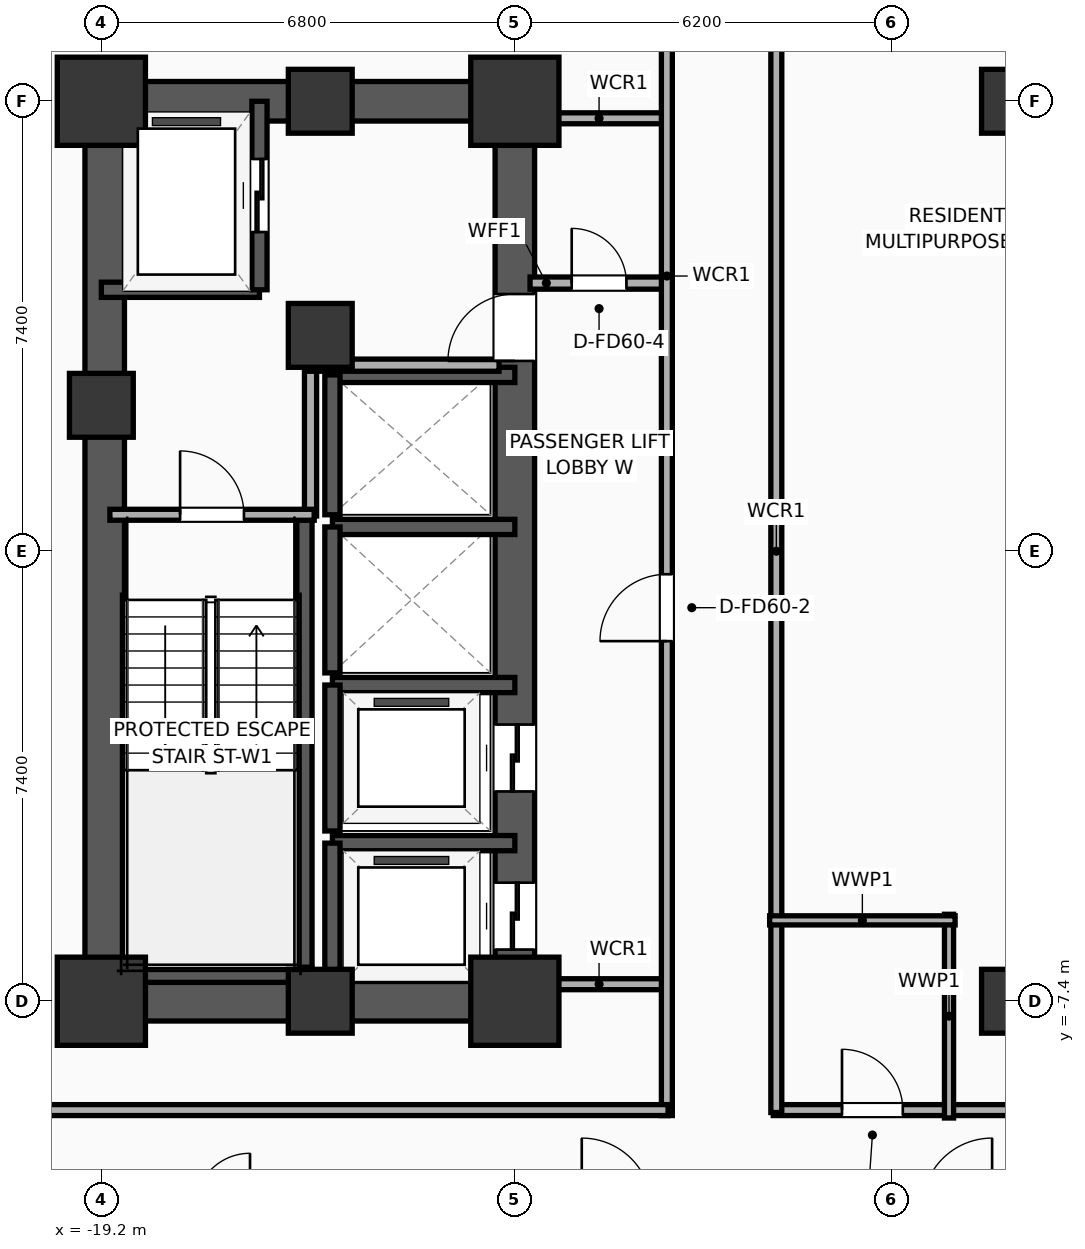
"""IFC4 building model, lengths in metres.
Left out: names, types, materials, properties, quantities, classifications, styles, units other than length and angle.
Written with IfcOpenShell. Run it as: python <this file> out.ifc"""

import sys

from ifc_helpers import new_model, si_unit, direction, frame, frame_2d, origin, origin_2d, place, context, subcontext, project, spatial, rectangle, extrude, element, fill, save


model = new_model("IFC4")
c1 = context("Model", 3, precision=1e-05, world=origin(), true_north=direction((0.0, 1.0)))
c2 = subcontext(c1, "Body", "Model", "MODEL_VIEW")
j1 = project(units=[si_unit("LENGTHUNIT", "METRE"), si_unit("PLANEANGLEUNIT", "RADIAN")], contexts=[c1])
p1 = place(None, origin())
s1 = spatial("IfcSite", under=j1, at=p1, CompositionType="ELEMENT")
p2 = place(p1, origin())
s2 = spatial("IfcBuilding", under=s1, at=p2, CompositionType="ELEMENT")
p3 = place(p2, frame((0.0, 0.0, 61.1)))
s3 = spatial("IfcBuildingStorey", under=s2, at=p3, CompositionType="ELEMENT", Elevation=61.1)
p4 = place(p3, frame((-19.2, -7.4, 0.0), z_axis=(0.0, 0.0, 1.0), x_axis=(1.0, 0.0, 0.0)))
e1 = element("IfcColumn", 1, at=p4, inside=s3, PredefinedType="COLUMN", context=c2, shape_type="SweptSolid", body=[
    extrude(rectangle(XDim=1.45, YDim=1.45, at=origin_2d()), origin(), (0.0, 0.0, 1.0), 3.9),
])
p5 = place(p3, frame((-19.2, 2.4, 0.0), z_axis=(0.0, 0.0, 1.0), x_axis=(1.0, 0.0, 0.0)))
e2 = element("IfcColumn", 2, at=p5, inside=s3, PredefinedType="COLUMN", context=c2, shape_type="SweptSolid", body=[
    extrude(rectangle(XDim=1.05, YDim=1.05, at=origin_2d()), origin(), (0.0, 0.0, 1.0), 3.9),
])
p6 = place(p3, frame((-19.2, 7.4, 0.0), z_axis=(0.0, 0.0, 1.0), x_axis=(1.0, 0.0, 0.0)))
e3 = element("IfcColumn", 3, at=p6, inside=s3, PredefinedType="COLUMN", context=c2, shape_type="SweptSolid", body=[
    extrude(rectangle(XDim=1.45, YDim=1.45, at=origin_2d()), origin(), (0.0, 0.0, 1.0), 3.9),
])
for number, where, z_axis, x_axis in (
    (4, (-15.6, -7.4, 0.0), (0.0, 0.0, 1.0), (1.0, 0.0, 0.0)),
    (5, (-15.6, 7.4, 0.0), (0.0, 0.0, 1.0), (1.0, 0.0, 0.0)),
):
    element("IfcColumn", number, at=place(p3, frame(where, z_axis=z_axis, x_axis=x_axis)), inside=s3, PredefinedType="COLUMN", context=c2, shape_type="SweptSolid", body=[
        extrude(rectangle(XDim=1.05, YDim=1.05, at=origin_2d()), origin(), (0.0, 0.0, 1.0), 3.9),
    ])
p7 = place(p3, frame((-12.4, -7.4, 0.0), z_axis=(0.0, 0.0, 1.0), x_axis=(1.0, 0.0, 0.0)))
e6 = element("IfcColumn", 6, at=p7, inside=s3, PredefinedType="COLUMN", context=c2, shape_type="SweptSolid", body=[
    extrude(rectangle(XDim=1.45, YDim=1.45, at=origin_2d()), origin(), (0.0, 0.0, 1.0), 3.9),
])
p8 = place(p3, frame((-15.6, 3.55, 0.0), z_axis=(0.0, 0.0, 1.0), x_axis=(1.0, 0.0, 0.0)))
e7 = element("IfcColumn", 7, at=p8, inside=s3, PredefinedType="COLUMN", context=c2, shape_type="SweptSolid", body=[
    extrude(rectangle(XDim=1.05, YDim=1.05, at=origin_2d()), origin(), (0.0, 0.0, 1.0), 3.9),
])
p9 = place(p3, frame((-12.4, 7.4, 0.0), z_axis=(0.0, 0.0, 1.0), x_axis=(1.0, 0.0, 0.0)))
e8 = element("IfcColumn", 8, at=p9, inside=s3, PredefinedType="COLUMN", context=c2, shape_type="SweptSolid", body=[
    extrude(rectangle(XDim=1.45, YDim=1.45, at=origin_2d()), origin(), (0.0, 0.0, 1.0), 3.9),
])
for number, where, z_axis, x_axis in (
    (9, (-19.525, -7.4, 0.0), (0.0, 0.0, 1.0), (1.0, 0.0, 0.0)),
    (10, (-19.525, 7.4, 0.0), (0.0, 0.0, 1.0), (1.0, 0.0, 0.0)),
):
    element("IfcWall", number, at=place(p3, frame(where, z_axis=z_axis, x_axis=x_axis)), inside=s3, PredefinedType="SHEAR", context=c2, shape_type="SweptSolid", body=[
        extrude(rectangle(XDim=7.45, YDim=0.65, at=frame_2d((3.725, 0.0))), origin(), (0.0, 0.0, 1.0), 3.65),
    ])
p10 = place(p3, frame((-19.145, -7.4, 0.0), z_axis=(0.0, 0.0, 1.0), x_axis=(0.0, 1.0, 0.0)))
e11 = element("IfcWall", 11, at=p10, inside=s3, PredefinedType="SHEAR", context=c2, shape_type="SweptSolid", body=[
    extrude(rectangle(XDim=14.8, YDim=0.65, at=frame_2d((7.4, 0.0))), origin(), (0.0, 0.0, 1.0), 3.65),
])
p11 = place(p3, frame((-12.4, -7.4, 0.0), z_axis=(0.0, 0.0, 1.0), x_axis=(0.0, 1.0, 0.0)))
e12 = element("IfcWall", 12, at=p11, inside=s3, PredefinedType="SHEAR", context=c2, shape_type="SweptSolid", body=[
    extrude(rectangle(XDim=14.8, YDim=0.65, at=frame_2d((7.4, 0.0))), origin(), (0.0, 0.0, 1.0), 3.65),
])
p12 = place(p11, frame((0.85, 0.0, 0.0)))
e13 = element("IfcOpeningElement", 13, at=p12, cuts=e12, PredefinedType="OPENING", context=c2, shape_type="SweptSolid", body=[
    extrude(rectangle(XDim=1.1, YDim=2.05, at=frame_2d((0.55, 1.025))), frame((0.0, 0.335, 0.0), z_axis=(0.0, -1.0, 0.0), x_axis=(1.0, 0.0, 0.0)), (0.0, 0.0, 1.0), 0.67),
])
p13 = place(p11, frame((3.45, 0.0, 0.0)))
e14 = element("IfcOpeningElement", 14, at=p13, cuts=e12, PredefinedType="OPENING", context=c2, shape_type="SweptSolid", body=[
    extrude(rectangle(XDim=1.1, YDim=2.05, at=frame_2d((0.55, 1.025))), frame((0.0, 0.335, 0.0), z_axis=(0.0, -1.0, 0.0), x_axis=(1.0, 0.0, 0.0)), (0.0, 0.0, 1.0), 0.67),
])
p14 = place(p11, frame((10.53, 0.0, 0.0)))
e15 = element("IfcOpeningElement", 15, at=p14, cuts=e12, PredefinedType="OPENING", context=c2, shape_type="SweptSolid", body=[
    extrude(rectangle(XDim=1.1, YDim=2.05, at=frame_2d((0.55, 1.025))), frame((0.0, 0.335, 0.0), z_axis=(0.0, -1.0, 0.0), x_axis=(1.0, 0.0, 0.0)), (0.0, 0.0, 1.0), 0.67),
])
p15 = place(p3, frame((-15.86, -7.085, 0.0), z_axis=(0.0, 0.0, 1.0), x_axis=(0.0, 1.0, 0.0)))
e16 = element("IfcWall", 16, at=p15, inside=s3, PredefinedType="SOLIDWALL", context=c2, shape_type="SweptSolid", body=[
    extrude(rectangle(XDim=7.685, YDim=0.25, at=frame_2d((3.843, 0.0))), origin(), (0.0, 0.0, 1.0), 3.65),
])
p16 = place(p3, frame((-19.2, -6.965, 0.0), z_axis=(0.0, 0.0, 1.0), x_axis=(1.0, 0.0, 0.0)))
e17 = element("IfcWall", 17, at=p16, inside=s3, PredefinedType="SOLIDWALL", context=c2, shape_type="SweptSolid", body=[
    extrude(rectangle(XDim=3.46, YDim=0.25, at=frame_2d((1.73, 0.0))), origin(), (0.0, 0.0, 1.0), 3.65),
])
for number, where, z_axis, x_axis in (
    (18, (-4.2, -7.4, 0.0), (0.0, 0.0, 1.0), (1.0, 0.0, 0.0)),
    (19, (-4.2, 7.4, 0.0), (0.0, 0.0, 1.0), (1.0, 0.0, 0.0)),
):
    element("IfcColumn", number, at=place(p3, frame(where, z_axis=z_axis, x_axis=x_axis)), inside=s3, PredefinedType="COLUMN", context=c2, shape_type="SweptSolid", body=[
        extrude(rectangle(XDim=1.05, YDim=1.05, at=origin_2d()), origin(), (0.0, 0.0, 1.0), 3.9),
    ])
p17 = place(p3, frame((-19.2, 4.3, 0.0), z_axis=(0.0, 0.0, 1.0), x_axis=(1.0, 0.0, 0.0)))
e20 = element("IfcWall", 20, at=p17, inside=s3, PredefinedType="SOLIDWALL", context=c2, shape_type="SweptSolid", body=[
    extrude(rectangle(XDim=2.6, YDim=0.25, at=frame_2d((1.3, 0.0))), origin(), (0.0, 0.0, 1.0), 3.65),
])
p18 = place(p3, frame((-16.6, 4.3, 0.0), z_axis=(0.0, 0.0, 1.0), x_axis=(0.0, 1.0, 0.0)))
e21 = element("IfcWall", 21, at=p18, inside=s3, PredefinedType="SOLIDWALL", context=c2, shape_type="SweptSolid", body=[
    extrude(rectangle(XDim=3.1, YDim=0.25, at=frame_2d((1.55, 0.0))), origin(), (0.0, 0.0, 1.0), 3.65),
])
p19 = place(p18, frame((0.95, 0.0, 0.0)))
e22 = element("IfcOpeningElement", 22, at=p19, cuts=e21, PredefinedType="OPENING", context=c2, shape_type="SweptSolid", body=[
    extrude(rectangle(XDim=1.2, YDim=2.05, at=frame_2d((0.6, 1.025))), frame((0.0, 0.135, 0.0), z_axis=(0.0, -1.0, 0.0), x_axis=(1.0, 0.0, 0.0)), (0.0, 0.0, 1.0), 0.27),
])
p20 = place(p3, frame((-12.4, -4.8, 0.0), z_axis=(0.0, 0.0, 1.0), x_axis=(-1.0, 0.0, 0.0)))
e23 = element("IfcWall", 23, at=p20, inside=s3, PredefinedType="SOLIDWALL", context=c2, shape_type="SweptSolid", body=[
    extrude(rectangle(XDim=3.0, YDim=0.25, at=frame_2d((1.5, 0.0))), origin(), (0.0, 0.0, 1.0), 3.65),
])
p21 = place(p3, frame((-15.4, -4.8, 0.0), z_axis=(0.0, 0.0, 1.0), x_axis=(0.0, -1.0, 0.0)))
e24 = element("IfcWall", 24, at=p21, inside=s3, PredefinedType="SOLIDWALL", context=c2, shape_type="SweptSolid", body=[
    extrude(rectangle(XDim=2.6, YDim=0.25, at=frame_2d((1.3, 0.0))), origin(), (0.0, 0.0, 1.0), 3.65),
])
p22 = place(p3, frame((-12.4, -2.2, 0.0), z_axis=(0.0, 0.0, 1.0), x_axis=(-1.0, 0.0, 0.0)))
e25 = element("IfcWall", 25, at=p22, inside=s3, PredefinedType="SOLIDWALL", context=c2, shape_type="SweptSolid", body=[
    extrude(rectangle(XDim=3.0, YDim=0.25, at=frame_2d((1.5, 0.0))), origin(), (0.0, 0.0, 1.0), 3.65),
])
p23 = place(p3, frame((-15.4, -2.2, 0.0), z_axis=(0.0, 0.0, 1.0), x_axis=(0.0, -1.0, 0.0)))
e26 = element("IfcWall", 26, at=p23, inside=s3, PredefinedType="SOLIDWALL", context=c2, shape_type="SweptSolid", body=[
    extrude(rectangle(XDim=2.4, YDim=0.25, at=frame_2d((1.2, 0.0))), origin(), (0.0, 0.0, 1.0), 3.65),
])
p24 = place(p3, frame((-12.4, 0.4, 0.0), z_axis=(0.0, 0.0, 1.0), x_axis=(-1.0, 0.0, 0.0)))
e27 = element("IfcWall", 27, at=p24, inside=s3, PredefinedType="SOLIDWALL", context=c2, shape_type="SweptSolid", body=[
    extrude(rectangle(XDim=3.0, YDim=0.25, at=frame_2d((1.5, 0.0))), origin(), (0.0, 0.0, 1.0), 3.65),
])
p25 = place(p3, frame((-15.4, 0.4, 0.0), z_axis=(0.0, 0.0, 1.0), x_axis=(0.0, -1.0, 0.0)))
e28 = element("IfcWall", 28, at=p25, inside=s3, PredefinedType="SOLIDWALL", context=c2, shape_type="SweptSolid", body=[
    extrude(rectangle(XDim=2.4, YDim=0.25, at=frame_2d((1.2, 0.0))), origin(), (0.0, 0.0, 1.0), 3.65),
])
p26 = place(p3, frame((-12.4, 2.9, 0.0), z_axis=(0.0, 0.0, 1.0), x_axis=(-1.0, 0.0, 0.0)))
e29 = element("IfcWall", 29, at=p26, inside=s3, PredefinedType="SOLIDWALL", context=c2, shape_type="SweptSolid", body=[
    extrude(rectangle(XDim=3.0, YDim=0.25, at=frame_2d((1.5, 0.0))), origin(), (0.0, 0.0, 1.0), 3.65),
])
p27 = place(p3, frame((-15.4, 2.9, 0.0), z_axis=(0.0, 0.0, 1.0), x_axis=(0.0, -1.0, 0.0)))
e30 = element("IfcWall", 30, at=p27, inside=s3, PredefinedType="SOLIDWALL", context=c2, shape_type="SweptSolid", body=[
    extrude(rectangle(XDim=2.3, YDim=0.25, at=frame_2d((1.15, 0.0))), origin(), (0.0, 0.0, 1.0), 3.65),
])
p28 = place(p3, frame((-15.76, 0.58, 0.0), z_axis=(0.0, 0.0, 1.0), x_axis=(0.0, 1.0, 0.0)))
e31 = element("IfcWall", 31, at=p28, inside=s3, PredefinedType="PARTITIONING", context=c2, shape_type="SweptSolid", body=[
    extrude(rectangle(XDim=2.52, YDim=0.2, at=frame_2d((1.26, 0.0))), origin(), (0.0, 0.0, 1.0), 3.65),
])
p29 = place(p3, frame((-15.82, 3.06, 0.0), z_axis=(0.0, 0.0, 1.0), x_axis=(1.0, 0.0, 0.0)))
e32 = element("IfcWall", 32, at=p29, inside=s3, PredefinedType="PARTITIONING", context=c2, shape_type="SweptSolid", body=[
    extrude(rectangle(XDim=3.16, YDim=0.2, at=frame_2d((1.58, 0.0))), origin(), (0.0, 0.0, 1.0), 3.65),
])
p30 = place(p3, frame((-19.06, 0.6, 0.0), z_axis=(0.0, 0.0, 1.0), x_axis=(1.0, 0.0, 0.0)))
e33 = element("IfcWall", 33, at=p30, inside=s3, PredefinedType="PARTITIONING", context=c2, shape_type="SweptSolid", body=[
    extrude(rectangle(XDim=3.36, YDim=0.18, at=frame_2d((1.68, 0.0))), origin(), (0.0, 0.0, 1.0), 3.65),
])
p31 = place(p30, frame((1.155, 0.0, 0.0)))
e34 = element("IfcOpeningElement", 34, at=p31, cuts=e33, PredefinedType="OPENING", context=c2, shape_type="SweptSolid", body=[
    extrude(rectangle(XDim=1.05, YDim=2.05, at=frame_2d((0.525, 1.025))), frame((0.0, 0.1, 0.0), z_axis=(0.0, -1.0, 0.0), x_axis=(1.0, 0.0, 0.0)), (0.0, 0.0, 1.0), 0.2),
])
p32 = place(p3, frame((-12.15, 4.41, 0.0), z_axis=(0.0, 0.0, 1.0), x_axis=(1.0, 0.0, 0.0)))
e35 = element("IfcWall", 35, at=p32, inside=s3, PredefinedType="PARTITIONING", context=c2, shape_type="SweptSolid", body=[
    extrude(rectangle(XDim=2.27, YDim=0.2, at=frame_2d((1.135, 0.0))), origin(), (0.0, 0.0, 1.0), 3.65),
])
p33 = place(p32, frame((0.685, 0.0, 0.0)))
e36 = element("IfcOpeningElement", 36, at=p33, cuts=e35, PredefinedType="OPENING", context=c2, shape_type="SweptSolid", body=[
    extrude(rectangle(XDim=0.9, YDim=2.05, at=frame_2d((0.45, 1.025))), frame((0.0, 0.11, 0.0), z_axis=(0.0, -1.0, 0.0), x_axis=(1.0, 0.0, 0.0)), (0.0, 0.0, 1.0), 0.22),
])
for number, where, z_axis, x_axis in (
    (37, (-12.15, 7.12, 0.0), (0.0, 0.0, 1.0), (1.0, 0.0, 0.0)),
    (38, (-12.15, -7.12, 0.0), (0.0, 0.0, 1.0), (1.0, 0.0, 0.0)),
):
    element("IfcWall", number, at=place(p3, frame(where, z_axis=z_axis, x_axis=x_axis)), inside=s3, PredefinedType="PARTITIONING", context=c2, shape_type="SweptSolid", body=[
        extrude(rectangle(XDim=2.27, YDim=0.18, at=frame_2d((1.135, 0.0))), origin(), (0.0, 0.0, 1.0), 2.94),
    ])
p34 = place(p3, frame((-9.9, -9.28, 0.0), z_axis=(0.0, 0.0, 1.0), x_axis=(0.0, 1.0, 0.0)))
e39 = element("IfcWall", 39, at=p34, inside=s3, PredefinedType="PARTITIONING", context=c2, shape_type="SweptSolid", body=[
    extrude(rectangle(XDim=18.56, YDim=0.18, at=frame_2d((9.28, 0.0))), origin(), (0.0, 0.0, 1.0), 3.65),
])
p35 = place(p34, frame((7.802, 0.0, 0.0)))
e40 = element("IfcOpeningElement", 40, at=p35, cuts=e39, PredefinedType="OPENING", context=c2, shape_type="SweptSolid", body=[
    extrude(rectangle(XDim=1.1, YDim=2.05, at=frame_2d((0.55, 1.025))), frame((0.0, 0.1, 0.0), z_axis=(0.0, -1.0, 0.0), x_axis=(1.0, 0.0, 0.0)), (0.0, 0.0, 1.0), 0.2),
])
p36 = place(p3, frame((-33.41, -9.19, 0.0), z_axis=(0.0, 0.0, 1.0), x_axis=(1.0, 0.0, 0.0)))
e41 = element("IfcWall", 41, at=p36, inside=s3, PredefinedType="PARTITIONING", context=c2, shape_type="SweptSolid", body=[
    extrude(rectangle(XDim=23.53, YDim=0.18, at=frame_2d((11.765, 0.0))), origin(), (0.0, 0.0, 1.0), 3.65),
])
p37 = place(p3, frame((-8.15, -9.19, 0.0), z_axis=(0.0, 0.0, 1.0), x_axis=(1.0, 0.0, 0.0)))
e42 = element("IfcWall", 42, at=p37, inside=s3, PredefinedType="PARTITIONING", context=c2, shape_type="SweptSolid", body=[
    extrude(rectangle(XDim=16.3, YDim=0.18, at=frame_2d((8.15, 0.0))), origin(), (0.0, 0.0, 1.0), 3.65),
])
p38 = place(p37, frame((1.13, 0.0, 0.0)))
e43 = element("IfcOpeningElement", 43, at=p38, cuts=e42, PredefinedType="OPENING", context=c2, shape_type="SweptSolid", body=[
    extrude(rectangle(XDim=1.0, YDim=2.05, at=frame_2d((0.5, 1.025))), frame((0.0, 0.1, 0.0), z_axis=(0.0, -1.0, 0.0), x_axis=(1.0, 0.0, 0.0)), (0.0, 0.0, 1.0), 0.2),
])
p39 = place(p37, frame((10.12, 0.0, 0.0)))
e44 = element("IfcOpeningElement", 44, at=p39, cuts=e42, PredefinedType="OPENING", context=c2, shape_type="SweptSolid", body=[
    extrude(rectangle(XDim=0.95, YDim=2.05, at=frame_2d((0.475, 1.025))), frame((0.0, 0.1, 0.0), z_axis=(0.0, -1.0, 0.0), x_axis=(1.0, 0.0, 0.0)), (0.0, 0.0, 1.0), 0.2),
])
p40 = place(p3, frame((-8.1, -9.23, 0.0), z_axis=(0.0, 0.0, 1.0), x_axis=(0.0, 1.0, 0.0)))
e45 = element("IfcWall", 45, at=p40, inside=s3, PredefinedType="PARTITIONING", context=c2, shape_type="SweptSolid", body=[
    extrude(rectangle(XDim=18.46, YDim=0.18, at=frame_2d((9.23, 0.0))), origin(), (0.0, 0.0, 1.0), 3.65),
])
p41 = place(p3, frame((-5.26, -9.32, 0.0), z_axis=(0.0, 0.0, 1.0), x_axis=(0.0, 1.0, 0.0)))
e46 = element("IfcWall", 46, at=p41, inside=s3, PredefinedType="PLUMBINGWALL", context=c2, shape_type="SweptSolid", body=[
    extrude(rectangle(XDim=3.35, YDim=0.15, at=frame_2d((1.675, 0.0))), origin(), (0.0, 0.0, 1.0), 3.65),
])
p42 = place(p3, frame((-8.21, -6.07, 0.0), z_axis=(0.0, 0.0, 1.0), x_axis=(1.0, 0.0, 0.0)))
e47 = element("IfcWall", 47, at=p42, inside=s3, PredefinedType="PLUMBINGWALL", context=c2, shape_type="SweptSolid", body=[
    extrude(rectangle(XDim=3.05, YDim=0.15, at=frame_2d((1.525, 0.0))), origin(), (0.0, 0.0, 1.0), 3.65),
])
p43 = place(p19, origin())
e48 = element("IfcDoor", 48, at=p43, inside=s3, OperationType="SLIDING_TO_LEFT", PredefinedType="DOOR", context=c2, shape_type="SweptSolid", body=[
    extrude(rectangle(XDim=1.2, YDim=2.05, at=frame_2d((0.6, 1.025))), frame((0.0, 0.025, 0.0), z_axis=(0.0, -1.0, 0.0), x_axis=(1.0, 0.0, 0.0)), (0.0, 0.0, 1.0), 0.05),
])
fill(e22, e48)
p44 = place(p12, origin())
e49 = element("IfcDoor", 49, at=p44, inside=s3, OperationType="SLIDING_TO_LEFT", PredefinedType="DOOR", context=c2, shape_type="SweptSolid", body=[
    extrude(rectangle(XDim=1.1, YDim=2.05, at=frame_2d((0.55, 1.025))), frame((0.0, 0.025, 0.0), z_axis=(0.0, -1.0, 0.0), x_axis=(1.0, 0.0, 0.0)), (0.0, 0.0, 1.0), 0.05),
])
fill(e13, e49)
p45 = place(p13, origin())
e50 = element("IfcDoor", 50, at=p45, inside=s3, OperationType="SLIDING_TO_LEFT", PredefinedType="DOOR", context=c2, shape_type="SweptSolid", body=[
    extrude(rectangle(XDim=1.1, YDim=2.05, at=frame_2d((0.55, 1.025))), frame((0.0, 0.025, 0.0), z_axis=(0.0, -1.0, 0.0), x_axis=(1.0, 0.0, 0.0)), (0.0, 0.0, 1.0), 0.05),
])
fill(e14, e50)
p46 = place(p31, origin())
e51 = element("IfcDoor", 51, at=p46, inside=s3, OperationType="SINGLE_SWING_LEFT", PredefinedType="DOOR", context=c2, shape_type="SweptSolid", body=[
    extrude(rectangle(XDim=1.05, YDim=2.05, at=frame_2d((0.525, 1.025))), frame((0.0, 0.025, 0.0), z_axis=(0.0, -1.0, 0.0), x_axis=(1.0, 0.0, 0.0)), (0.0, 0.0, 1.0), 0.05),
])
fill(e34, e51)
p47 = place(p33, origin())
e52 = element("IfcDoor", 52, at=p47, inside=s3, OperationType="SINGLE_SWING_LEFT", PredefinedType="DOOR", context=c2, shape_type="SweptSolid", body=[
    extrude(rectangle(XDim=0.9, YDim=2.05, at=frame_2d((0.45, 1.025))), frame((0.0, 0.025, 0.0), z_axis=(0.0, -1.0, 0.0), x_axis=(1.0, 0.0, 0.0)), (0.0, 0.0, 1.0), 0.05),
])
fill(e36, e52)
p48 = place(p35, origin())
e53 = element("IfcDoor", 53, at=p48, inside=s3, OperationType="SINGLE_SWING_LEFT", PredefinedType="DOOR", context=c2, shape_type="SweptSolid", body=[
    extrude(rectangle(XDim=1.1, YDim=2.05, at=frame_2d((0.55, 1.025))), frame((0.0, 0.025, 0.0), z_axis=(0.0, -1.0, 0.0), x_axis=(1.0, 0.0, 0.0)), (0.0, 0.0, 1.0), 0.05),
])
fill(e40, e53)
p49 = place(p38, origin())
e54 = element("IfcDoor", 54, at=p49, inside=s3, OperationType="SINGLE_SWING_LEFT", PredefinedType="DOOR", context=c2, shape_type="SweptSolid", body=[
    extrude(rectangle(XDim=1.0, YDim=2.05, at=frame_2d((0.5, 1.025))), frame((0.0, 0.025, 0.0), z_axis=(0.0, -1.0, 0.0), x_axis=(1.0, 0.0, 0.0)), (0.0, 0.0, 1.0), 0.05),
])
fill(e43, e54)
p50 = place(p14, origin())
e55 = element("IfcDoor", 55, at=p50, inside=s3, OperationType="SINGLE_SWING_LEFT", PredefinedType="DOOR", context=c2, shape_type="SweptSolid", body=[
    extrude(rectangle(XDim=1.1, YDim=2.05, at=frame_2d((0.55, 1.025))), frame((0.0, 0.025, 0.0), z_axis=(0.0, -1.0, 0.0), x_axis=(1.0, 0.0, 0.0)), (0.0, 0.0, 1.0), 0.05),
])
fill(e15, e55)
save(model, sys.argv[1])
